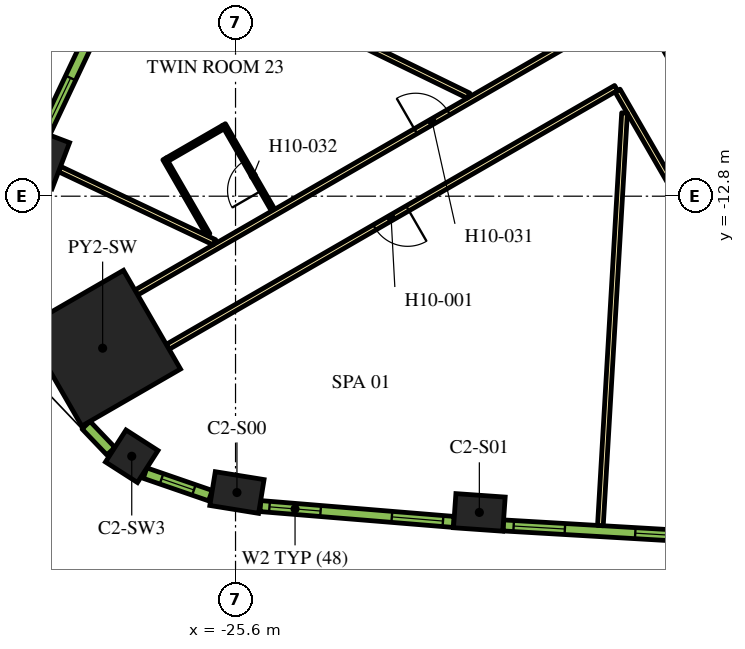
"""IFC4 building model, lengths in metres.
Left out: names, types, materials, properties, quantities, classifications, styles, units other than length and angle.
Written with IfcOpenShell. Run it as: python <this file> out.ifc"""

import sys

from ifc_helpers import new_model, si_unit, direction, frame, frame_2d, origin, origin_2d, place, context, subcontext, project, spatial, rectangle, extrude, element, fill, save


model = new_model("IFC4")
c1 = context("Model", 3, precision=1e-05, world=origin(), true_north=direction((0.0, 1.0)))
c2 = subcontext(c1, "Body", "Model", "MODEL_VIEW")
j1 = project(units=[si_unit("LENGTHUNIT", "METRE"), si_unit("PLANEANGLEUNIT", "RADIAN")], contexts=[c1])
p1 = place(None, origin())
s1 = spatial("IfcSite", under=j1, at=p1, CompositionType="ELEMENT")
p2 = place(p1, origin())
s2 = spatial("IfcBuilding", under=s1, at=p2, CompositionType="ELEMENT")
p3 = place(p2, frame((0.0, 0.0, 130.5)))
s3 = spatial("IfcBuildingStorey", under=s2, at=p3, CompositionType="ELEMENT", Elevation=130.5)
p4 = place(p3, frame((-29.097, -16.799, 0.0), z_axis=(0.0, 0.0, 1.0), x_axis=(-0.866025403784, -0.5, 0.0)))
e1 = element("IfcColumn", 1, at=p4, inside=s3, PredefinedType="COLUMN", context=c2, shape_type="SweptSolid", body=[
    extrude(rectangle(XDim=3.0, YDim=3.0, at=origin_2d()), origin(), (0.0, 0.0, 1.0), 3.9),
])
for number, where, z_axis, x_axis in (
    (2, (-25.563, -20.597, 0.0), (0.0, 0.0, 1.0), (0.987, -0.159, 0.0)),
    (3, (-19.184, -21.12, 0.0), (0.0, 0.0, 1.0), (0.998, -0.07, 0.0)),
    (4, (-30.619, -11.839, 0.0), (0.0, 0.0, 1.0), (-0.355, -0.935, 0.0)),
):
    element("IfcColumn", number, at=place(p3, frame(where, z_axis=z_axis, x_axis=x_axis)), inside=s3, PredefinedType="COLUMN", context=c2, shape_type="SweptSolid", body=[
        extrude(rectangle(XDim=1.3, YDim=0.9, at=origin_2d()), origin(), (0.0, 0.0, 1.0), 3.9),
    ])
p5 = place(p3, frame((-28.331, -19.643, 0.0), z_axis=(0.0, 0.0, 1.0), x_axis=(0.841700252504, -0.53994507585, 0.0)))
e5 = element("IfcColumn", 5, at=p5, inside=s3, PredefinedType="COLUMN", context=c2, shape_type="SweptSolid", body=[
    extrude(rectangle(XDim=1.0, YDim=1.0, at=origin_2d()), origin(), (0.0, 0.0, 1.0), 3.9),
])
p6 = place(p3, frame((-12.134, -11.883, 0.0), z_axis=(0.0, 0.0, 1.0), x_axis=(-0.500005339912, 0.866022320763, 0.0)))
e6 = element("IfcWall", 6, at=p6, inside=s3, PredefinedType="SOLIDWALL", context=c2, shape_type="SweptSolid", body=[
    extrude(rectangle(XDim=9.488, YDim=0.9, at=frame_2d((4.744, 0.0))), origin(), (0.0, 0.0, 1.0), 3.9),
])
p7 = place(p3, frame((-12.885, -9.431, 0.0), z_axis=(0.0, 0.0, 1.0), x_axis=(-0.500020560727, 0.866013532718, 0.0)))
e7 = element("IfcWall", 7, at=p7, inside=s3, PredefinedType="SOLIDWALL", context=c2, shape_type="SweptSolid", body=[
    extrude(rectangle(XDim=3.45, YDim=0.25, at=frame_2d((1.725, 0.0))), origin(), (0.0, 0.0, 1.0), 3.9),
])
p8 = place(p3, frame((-28.211, -15.335, 0.0), z_axis=(0.0, 0.0, 1.0), x_axis=(0.866025884867, 0.49999916674, 0.0)))
e8 = element("IfcWall", 8, at=p8, inside=s3, PredefinedType="PARTITIONING", context=c2, shape_type="SweptSolid", body=[
    extrude(rectangle(XDim=13.543, YDim=0.15, at=frame_2d((6.772, 0.0))), origin(), (0.0, 0.0, 1.0), 2.6),
])
p9 = place(p8, frame((8.488, 0.0, 0.0)))
e9 = element("IfcOpeningElement", 9, at=p9, cuts=e8, PredefinedType="OPENING", context=c2, shape_type="SweptSolid", body=[
    extrude(rectangle(XDim=1.0, YDim=2.1, at=frame_2d((0.5, 1.05))), frame((0.0, 0.085, 0.0), z_axis=(0.0, -1.0, 0.0), x_axis=(1.0, 0.0, 0.0)), (0.0, 0.0, 1.0), 0.17),
])
p10 = place(p3, frame((-15.587, -9.952, 0.0), z_axis=(0.0, 0.0, 1.0), x_axis=(-0.866017869832, -0.500013048961, 0.0)))
e10 = element("IfcWall", 10, at=p10, inside=s3, PredefinedType="PARTITIONING", context=c2, shape_type="SweptSolid", body=[
    extrude(rectangle(XDim=13.624, YDim=0.15, at=frame_2d((6.812, 0.0))), origin(), (0.0, 0.0, 1.0), 2.6),
])
p11 = place(p10, frame((6.334, 0.0, 0.0)))
e11 = element("IfcOpeningElement", 11, at=p11, cuts=e10, PredefinedType="OPENING", context=c2, shape_type="SweptSolid", body=[
    extrude(rectangle(XDim=1.0, YDim=2.1, at=frame_2d((0.5, 1.05))), frame((0.0, 0.085, 0.0), z_axis=(0.0, -1.0, 0.0), x_axis=(1.0, 0.0, 0.0)), (0.0, 0.0, 1.0), 0.17),
])
p12 = place(p3, frame((-12.918, -14.575, 0.0), z_axis=(0.0, 0.0, 1.0), x_axis=(-0.500009150678, 0.866020120573, 0.0)))
e12 = element("IfcWall", 12, at=p12, inside=s3, PredefinedType="PARTITIONING", context=c2, shape_type="SweptSolid", body=[
    extrude(rectangle(XDim=5.258, YDim=0.15, at=frame_2d((2.629, 0.0))), origin(), (0.0, 0.0, 1.0), 2.6),
])
p13 = place(p3, frame((-30.231, -12.085, 0.0), z_axis=(0.0, 0.0, 1.0), x_axis=(0.904001132572, -0.427530060122, 0.0)))
e13 = element("IfcWall", 13, at=p13, inside=s3, PredefinedType="PARTITIONING", context=c2, shape_type="SweptSolid", body=[
    extrude(rectangle(XDim=4.51, YDim=0.15, at=frame_2d((2.255, 0.0))), origin(), (0.0, 0.0, 1.0), 2.6),
])
p14 = place(p3, frame((-27.479, -6.251, 0.0), z_axis=(0.0, 0.0, 1.0), x_axis=(0.898945877276, -0.438059710231, 0.0)))
e14 = element("IfcWall", 14, at=p14, inside=s3, PredefinedType="PARTITIONING", context=c2, shape_type="SweptSolid", body=[
    extrude(rectangle(XDim=8.909, YDim=0.15, at=frame_2d((4.455, 0.0))), origin(), (0.0, 0.0, 1.0), 2.6),
])
p15 = place(p3, frame((-15.999, -21.467, 0.0), z_axis=(0.0, 0.0, 1.0), x_axis=(0.058411453297, 0.998292593443, 0.0)))
e15 = element("IfcWall", 15, at=p15, inside=s3, PredefinedType="PARTITIONING", context=c2, shape_type="SweptSolid", body=[
    extrude(rectangle(XDim=10.875, YDim=0.15, at=frame_2d((5.438, 0.0))), origin(), (0.0, 0.0, 1.0), 2.6),
])
p16 = place(p3, frame((-24.61, -13.169, 0.0), z_axis=(0.0, 0.0, 1.0), x_axis=(-0.500006934395, 0.866021400173, 0.0)))
e16 = element("IfcWall", 16, at=p16, inside=s3, PredefinedType="PARTITIONING", context=c2, shape_type="SweptSolid", body=[
    extrude(rectangle(XDim=2.6, YDim=0.1, at=frame_2d((1.3, 0.0))), origin(), (0.0, 0.0, 1.0), 2.6),
])
p17 = place(p16, frame((0.6, 0.0, 0.0)))
e17 = element("IfcOpeningElement", 17, at=p17, cuts=e16, PredefinedType="OPENING", context=c2, shape_type="SweptSolid", body=[
    extrude(rectangle(XDim=0.9, YDim=2.1, at=frame_2d((0.45, 1.05))), frame((0.0, 0.06, 0.0), z_axis=(0.0, -1.0, 0.0), x_axis=(1.0, 0.0, 0.0)), (0.0, 0.0, 1.0), 0.12),
])
p18 = place(p3, frame((-25.928, -10.986, 0.0), z_axis=(0.0, 0.0, 1.0), x_axis=(-0.865989465428, -0.500062241894, 0.0)))
e18 = element("IfcWall", 18, at=p18, inside=s3, PredefinedType="PARTITIONING", context=c2, shape_type="SweptSolid", body=[
    extrude(rectangle(XDim=1.7, YDim=0.1, at=frame_2d((0.85, 0.0))), origin(), (0.0, 0.0, 1.0), 2.6),
])
p19 = place(p3, frame((-26.319, -13.81, 0.0), z_axis=(0.0, 0.0, 1.0), x_axis=(-0.499952165731, 0.866053019151, 0.0)))
e19 = element("IfcWall", 19, at=p19, inside=s3, PredefinedType="PARTITIONING", context=c2, shape_type="SweptSolid", body=[
    extrude(rectangle(XDim=2.3, YDim=0.1, at=frame_2d((1.15, 0.0))), origin(), (0.0, 0.0, 1.0), 2.6),
])
p20 = place(p3, frame((-24.946, -20.954, 0.0), z_axis=(0.0, 0.0, 1.0), x_axis=(0.99665273362, -0.081751627308, 0.0)))
e20 = element("IfcWall", 20, at=p20, inside=s3, PredefinedType="SOLIDWALL", context=c2, shape_type="SweptSolid", body=[
    extrude(rectangle(XDim=5.107, YDim=0.29, at=frame_2d((2.553, 0.0))), origin(), (0.0, 0.0, 1.0), 3.5),
])
p21 = place(p20, frame((0.24, 0.0, 0.9)))
e21 = element("IfcOpeningElement", 21, at=p21, cuts=e20, PredefinedType="OPENING", context=c2, shape_type="SweptSolid", body=[
    extrude(rectangle(XDim=1.35, YDim=2.15, at=frame_2d((0.675, 1.075))), frame((0.0, 0.155, 0.0), z_axis=(0.0, -1.0, 0.0), x_axis=(1.0, 0.0, 0.0)), (0.0, 0.0, 1.0), 0.31),
])
p22 = place(p20, frame((3.471, 0.0, 0.9)))
e22 = element("IfcOpeningElement", 22, at=p22, cuts=e20, PredefinedType="OPENING", context=c2, shape_type="SweptSolid", body=[
    extrude(rectangle(XDim=1.35, YDim=2.15, at=frame_2d((0.675, 1.075))), frame((0.0, 0.155, 0.0), z_axis=(0.0, -1.0, 0.0), x_axis=(1.0, 0.0, 0.0)), (0.0, 0.0, 1.0), 0.31),
])
p23 = place(p3, frame((-18.553, -21.463, 0.0), z_axis=(0.0, 0.0, 1.0), x_axis=(0.998290511436, -0.058447025388, 0.0)))
e23 = element("IfcWall", 23, at=p23, inside=s3, PredefinedType="SOLIDWALL", context=c2, shape_type="SweptSolid", body=[
    extrude(rectangle(XDim=5.1, YDim=0.29, at=frame_2d((2.55, 0.0))), origin(), (0.0, 0.0, 1.0), 3.5),
])
p24 = place(p23, frame((0.273, 0.0, 0.9)))
e24 = element("IfcOpeningElement", 24, at=p24, cuts=e23, PredefinedType="OPENING", context=c2, shape_type="SweptSolid", body=[
    extrude(rectangle(XDim=1.35, YDim=2.15, at=frame_2d((0.675, 1.075))), frame((0.0, 0.155, 0.0), z_axis=(0.0, -1.0, 0.0), x_axis=(1.0, 0.0, 0.0)), (0.0, 0.0, 1.0), 0.31),
])
p25 = place(p23, frame((3.478, 0.0, 0.9)))
e25 = element("IfcOpeningElement", 25, at=p25, cuts=e23, PredefinedType="OPENING", context=c2, shape_type="SweptSolid", body=[
    extrude(rectangle(XDim=1.35, YDim=2.15, at=frame_2d((0.675, 1.075))), frame((0.0, 0.155, 0.0), z_axis=(0.0, -1.0, 0.0), x_axis=(1.0, 0.0, 0.0)), (0.0, 0.0, 1.0), 0.31),
])
p26 = place(p3, frame((-28.436, -6.511, 0.0), z_axis=(0.0, 0.0, 1.0), x_axis=(-0.427543726596, -0.903994669148, 0.0)))
e26 = element("IfcWall", 26, at=p26, inside=s3, PredefinedType="SOLIDWALL", context=c2, shape_type="SweptSolid", body=[
    extrude(rectangle(XDim=5.107, YDim=0.29, at=frame_2d((2.553, 0.0))), origin(), (0.0, 0.0, 1.0), 3.5),
])
p27 = place(p26, frame((0.285, 0.0, 0.9)))
e27 = element("IfcOpeningElement", 27, at=p27, cuts=e26, PredefinedType="OPENING", context=c2, shape_type="SweptSolid", body=[
    extrude(rectangle(XDim=1.35, YDim=2.15, at=frame_2d((0.675, 1.075))), frame((0.0, 0.155, 0.0), z_axis=(0.0, -1.0, 0.0), x_axis=(1.0, 0.0, 0.0)), (0.0, 0.0, 1.0), 0.31),
])
p28 = place(p26, frame((3.516, 0.0, 0.9)))
e28 = element("IfcOpeningElement", 28, at=p28, cuts=e26, PredefinedType="OPENING", context=c2, shape_type="SweptSolid", body=[
    extrude(rectangle(XDim=1.35, YDim=2.15, at=frame_2d((0.675, 1.075))), frame((0.0, 0.155, 0.0), z_axis=(0.0, -1.0, 0.0), x_axis=(1.0, 0.0, 0.0)), (0.0, 0.0, 1.0), 0.31),
])
p29 = place(p3, frame((-29.534, -18.824, 0.0), z_axis=(0.0, 0.0, 1.0), x_axis=(0.690414427296, -0.723414071319, 0.0)))
e29 = element("IfcWall", 29, at=p29, inside=s3, PredefinedType="SOLIDWALL", context=c2, shape_type="SweptSolid", body=[
    extrude(rectangle(XDim=0.947, YDim=0.29, at=frame_2d((0.474, 0.0))), origin(), (0.0, 0.0, 1.0), 3.5),
])
p30 = place(p3, frame((-27.981, -20.086, 0.0), z_axis=(0.0, 0.0, 1.0), x_axis=(0.945385815453, -0.325953462844, 0.0)))
e30 = element("IfcWall", 30, at=p30, inside=s3, PredefinedType="SOLIDWALL", context=c2, shape_type="SweptSolid", body=[
    extrude(rectangle(XDim=1.819, YDim=0.29, at=frame_2d((0.91, 0.0))), origin(), (0.0, 0.0, 1.0), 3.5),
])
p31 = place(p30, frame((0.46, 0.0, 0.9)))
e31 = element("IfcOpeningElement", 31, at=p31, cuts=e30, PredefinedType="OPENING", context=c2, shape_type="SweptSolid", body=[
    extrude(rectangle(XDim=0.9, YDim=2.15, at=frame_2d((0.45, 1.075))), frame((0.0, 0.155, 0.0), z_axis=(0.0, -1.0, 0.0), x_axis=(1.0, 0.0, 0.0)), (0.0, 0.0, 1.0), 0.31),
])
p32 = place(p11, origin())
e32 = element("IfcDoor", 32, at=p32, inside=s3, OperationType="SINGLE_SWING_LEFT", PredefinedType="DOOR", context=c2, shape_type="SweptSolid", body=[
    extrude(rectangle(XDim=1.0, YDim=2.1, at=frame_2d((0.5, 1.05))), frame((0.0, 0.025, 0.0), z_axis=(0.0, -1.0, 0.0), x_axis=(1.0, 0.0, 0.0)), (0.0, 0.0, 1.0), 0.05),
])
fill(e11, e32)
p33 = place(p9, origin())
e33 = element("IfcDoor", 33, at=p33, inside=s3, OperationType="SINGLE_SWING_RIGHT", PredefinedType="DOOR", context=c2, shape_type="SweptSolid", body=[
    extrude(rectangle(XDim=1.0, YDim=2.1, at=frame_2d((0.5, 1.05))), frame((0.0, 0.025, 0.0), z_axis=(0.0, -1.0, 0.0), x_axis=(1.0, 0.0, 0.0)), (0.0, 0.0, 1.0), 0.05),
])
fill(e9, e33)
p34 = place(p17, origin())
e34 = element("IfcDoor", 34, at=p34, inside=s3, OperationType="SINGLE_SWING_LEFT", PredefinedType="DOOR", context=c2, shape_type="SweptSolid", body=[
    extrude(rectangle(XDim=0.9, YDim=2.1, at=frame_2d((0.45, 1.05))), frame((0.0, 0.025, 0.0), z_axis=(0.0, -1.0, 0.0), x_axis=(1.0, 0.0, 0.0)), (0.0, 0.0, 1.0), 0.05),
])
fill(e17, e34)
p35 = place(p21, origin())
e35 = element("IfcWindow", 35, at=p35, inside=s3, PartitioningType="DOUBLE_PANEL_VERTICAL", PredefinedType="WINDOW", context=c2, shape_type="SweptSolid", body=[
    extrude(rectangle(XDim=1.35, YDim=2.15, at=frame_2d((0.675, 1.075))), frame((0.0, 0.015, 0.0), z_axis=(0.0, -1.0, 0.0), x_axis=(1.0, 0.0, 0.0)), (0.0, 0.0, 1.0), 0.06),
])
fill(e21, e35)
p36 = place(p22, origin())
e36 = element("IfcWindow", 36, at=p36, inside=s3, PartitioningType="DOUBLE_PANEL_VERTICAL", PredefinedType="WINDOW", context=c2, shape_type="SweptSolid", body=[
    extrude(rectangle(XDim=1.35, YDim=2.15, at=frame_2d((0.675, 1.075))), frame((0.0, 0.015, 0.0), z_axis=(0.0, -1.0, 0.0), x_axis=(1.0, 0.0, 0.0)), (0.0, 0.0, 1.0), 0.06),
])
fill(e22, e36)
p37 = place(p24, origin())
e37 = element("IfcWindow", 37, at=p37, inside=s3, PartitioningType="DOUBLE_PANEL_VERTICAL", PredefinedType="WINDOW", context=c2, shape_type="SweptSolid", body=[
    extrude(rectangle(XDim=1.35, YDim=2.15, at=frame_2d((0.675, 1.075))), frame((0.0, 0.015, 0.0), z_axis=(0.0, -1.0, 0.0), x_axis=(1.0, 0.0, 0.0)), (0.0, 0.0, 1.0), 0.06),
])
fill(e24, e37)
p38 = place(p25, origin())
e38 = element("IfcWindow", 38, at=p38, inside=s3, PartitioningType="DOUBLE_PANEL_VERTICAL", PredefinedType="WINDOW", context=c2, shape_type="SweptSolid", body=[
    extrude(rectangle(XDim=1.35, YDim=2.15, at=frame_2d((0.675, 1.075))), frame((0.0, 0.015, 0.0), z_axis=(0.0, -1.0, 0.0), x_axis=(1.0, 0.0, 0.0)), (0.0, 0.0, 1.0), 0.06),
])
fill(e25, e38)
p39 = place(p28, origin())
e39 = element("IfcWindow", 39, at=p39, inside=s3, PartitioningType="DOUBLE_PANEL_VERTICAL", PredefinedType="WINDOW", context=c2, shape_type="SweptSolid", body=[
    extrude(rectangle(XDim=1.35, YDim=2.15, at=frame_2d((0.675, 1.075))), frame((0.0, 0.015, 0.0), z_axis=(0.0, -1.0, 0.0), x_axis=(1.0, 0.0, 0.0)), (0.0, 0.0, 1.0), 0.06),
])
fill(e28, e39)
p40 = place(p31, origin())
e40 = element("IfcWindow", 40, at=p40, inside=s3, PartitioningType="SINGLE_PANEL", PredefinedType="WINDOW", context=c2, shape_type="SweptSolid", body=[
    extrude(rectangle(XDim=0.9, YDim=2.15, at=frame_2d((0.45, 1.075))), frame((0.0, 0.015, 0.0), z_axis=(0.0, -1.0, 0.0), x_axis=(1.0, 0.0, 0.0)), (0.0, 0.0, 1.0), 0.06),
])
fill(e31, e40)
save(model, sys.argv[1])
